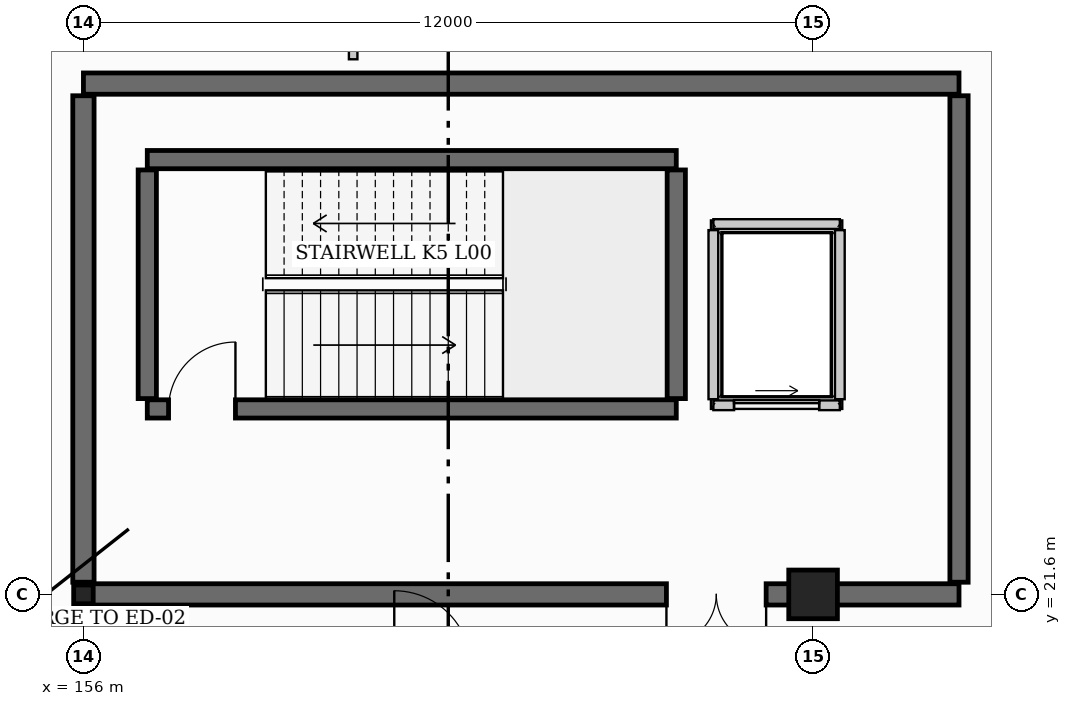
"""IFC4 building model, lengths in metres.
Left out: names, types, materials, properties, quantities, classifications, styles, units other than length and angle.
Written with IfcOpenShell. Run it as: python <this file> out.ifc"""

import sys

from ifc_helpers import new_model, si_unit, direction, frame, frame_2d, origin, origin_2d, place, context, subcontext, project, spatial, rectangle, i_section, extrude, element, fill, save


model = new_model("IFC4")
c1 = context("Model", 3, precision=1e-05, world=origin(), true_north=direction((0.0, 1.0)))
c2 = subcontext(c1, "Body", "Model", "MODEL_VIEW")
j1 = project(units=[si_unit("LENGTHUNIT", "METRE"), si_unit("PLANEANGLEUNIT", "RADIAN")], contexts=[c1])
p1 = place(None, origin())
s1 = spatial("IfcSite", under=j1, at=p1, CompositionType="ELEMENT")
p2 = place(p1, origin())
s2 = spatial("IfcBuilding", under=s1, at=p2, CompositionType="ELEMENT")
p3 = place(p2, origin())
s3 = spatial("IfcBuildingStorey", under=s2, at=p3, CompositionType="ELEMENT", Elevation=0.0)
p4 = place(p3, frame((156.0, 21.6, 0.0), z_axis=(0.0, 0.0, 1.0), x_axis=(0.0, 1.0, 0.0)))
e1 = element("IfcColumn", 1, at=p4, inside=s3, PredefinedType="COLUMN", context=c2, shape_type="SweptSolid", body=[
    extrude(i_section(OverallWidth=0.309, OverallDepth=0.321, WebThickness=0.014, FlangeThickness=0.022, at=origin_2d()), origin(), (0.0, 0.0, 1.0), 4.8),
])
p5 = place(p3, frame((168.0, 21.6, 0.0), z_axis=(0.0, 0.0, 1.0), x_axis=(1.0, 0.0, 0.0)))
e2 = element("IfcColumn", 2, at=p5, inside=s3, PredefinedType="COLUMN", context=c2, shape_type="SweptSolid", body=[
    extrude(rectangle(XDim=0.8, YDim=0.8, at=origin_2d()), origin(), (0.0, 0.0, 1.0), 4.8),
])
p6 = place(p3, frame((156.0, 30.0, 0.0), z_axis=(0.0, 0.0, 1.0), x_axis=(1.0, 0.0, 0.0)))
e3 = element("IfcWall", 3, at=p6, inside=s3, PredefinedType="SHEAR", context=c2, shape_type="SweptSolid", body=[
    extrude(rectangle(XDim=14.4, YDim=0.35, at=frame_2d((7.2, 0.0))), origin(), (0.0, 0.0, 1.0), 4.8),
])
p7 = place(p3, frame((170.4, 21.6, 0.0), z_axis=(0.0, 0.0, 1.0), x_axis=(-1.0, 0.0, 0.0)))
e4 = element("IfcWall", 4, at=p7, inside=s3, PredefinedType="SHEAR", context=c2, shape_type="SweptSolid", body=[
    extrude(rectangle(XDim=14.4, YDim=0.35, at=frame_2d((7.2, 0.0))), origin(), (0.0, 0.0, 1.0), 4.8),
])
p8 = place(p7, frame((3.172, 0.0, 0.0)))
e5 = element("IfcOpeningElement", 5, at=p8, cuts=e4, PredefinedType="OPENING", context=c2, shape_type="SweptSolid", body=[
    extrude(rectangle(XDim=1.64, YDim=2.2, at=frame_2d((0.82, 1.1))), frame((0.0, 0.185, 0.0), z_axis=(0.0, -1.0, 0.0), x_axis=(1.0, 0.0, 0.0)), (0.0, 0.0, 1.0), 0.37),
])
p9 = place(p3, frame((156.0, 21.8, 0.0), z_axis=(0.0, 0.0, 1.0), x_axis=(0.0, 1.0, 0.0)))
e6 = element("IfcWall", 6, at=p9, inside=s3, PredefinedType="SHEAR", context=c2, shape_type="SweptSolid", body=[
    extrude(rectangle(XDim=8.0, YDim=0.35, at=frame_2d((4.0, 0.0))), origin(), (0.0, 0.0, 1.0), 4.8),
])
p10 = place(p3, frame((170.4, 29.8, 0.0), z_axis=(0.0, 0.0, 1.0), x_axis=(0.0, -1.0, 0.0)))
e7 = element("IfcWall", 7, at=p10, inside=s3, PredefinedType="SHEAR", context=c2, shape_type="SweptSolid", body=[
    extrude(rectangle(XDim=8.0, YDim=0.3, at=frame_2d((4.0, 0.0))), origin(), (0.0, 0.0, 1.0), 4.8),
])
p11 = place(p3, frame((157.05, 24.65, 0.0), z_axis=(0.0, 0.0, 1.0), x_axis=(1.0, 0.0, 0.0)))
e8 = element("IfcWall", 8, at=p11, inside=s3, PredefinedType="SHEAR", context=c2, shape_type="SweptSolid", body=[
    extrude(rectangle(XDim=8.7, YDim=0.3, at=frame_2d((4.35, 0.0))), origin(), (0.0, 0.0, 1.0), 4.8),
])
p12 = place(p11, frame((0.35, 0.0, 0.0)))
e9 = element("IfcOpeningElement", 9, at=p12, cuts=e8, PredefinedType="OPENING", context=c2, shape_type="SweptSolid", body=[
    extrude(rectangle(XDim=1.1, YDim=2.15, at=frame_2d((0.55, 1.075))), frame((0.0, 0.16, 0.0), z_axis=(0.0, -1.0, 0.0), x_axis=(1.0, 0.0, 0.0)), (0.0, 0.0, 1.0), 0.32),
])
p13 = place(p3, frame((165.75, 28.75, 0.0), z_axis=(0.0, 0.0, 1.0), x_axis=(-1.0, 0.0, 0.0)))
e10 = element("IfcWall", 10, at=p13, inside=s3, PredefinedType="SHEAR", context=c2, shape_type="SweptSolid", body=[
    extrude(rectangle(XDim=8.7, YDim=0.3, at=frame_2d((4.35, 0.0))), origin(), (0.0, 0.0, 1.0), 4.8),
])
for number, where, z_axis, x_axis in (
    (11, (157.05, 24.82, 0.0), (0.0, 0.0, 1.0), (0.0, 1.0, 0.0)),
    (12, (165.75, 24.82, 0.0), (0.0, 0.0, 1.0), (0.0, 1.0, 0.0)),
):
    element("IfcWall", number, at=place(p3, frame(where, z_axis=z_axis, x_axis=x_axis)), inside=s3, PredefinedType="SHEAR", context=c2, shape_type="SweptSolid", body=[
        extrude(rectangle(XDim=3.76, YDim=0.3, at=frame_2d((1.88, 0.0))), origin(), (0.0, 0.0, 1.0), 4.8),
    ])
p14 = place(p3, frame((166.36, 24.71, 0.0), z_axis=(0.0, 0.0, 1.0), x_axis=(1.0, 0.0, 0.0)))
e13 = element("IfcWall", 13, at=p14, inside=s3, PredefinedType="PARTITIONING", context=c2, shape_type="SweptSolid", body=[
    extrude(rectangle(XDim=2.08, YDim=0.16, at=frame_2d((1.04, 0.0))), origin(), (0.0, 0.0, 1.0), 4.445),
])
p15 = place(p14, frame((0.34, 0.0, 0.0)))
e14 = element("IfcOpeningElement", 14, at=p15, cuts=e13, PredefinedType="OPENING", context=c2, shape_type="SweptSolid", body=[
    extrude(rectangle(XDim=1.4, YDim=2.2, at=frame_2d((0.7, 1.1))), frame((0.0, 0.09, 0.0), z_axis=(0.0, -1.0, 0.0), x_axis=(1.0, 0.0, 0.0)), (0.0, 0.0, 1.0), 0.18),
])
p16 = place(p3, frame((168.44, 27.69, 0.0), z_axis=(0.0, 0.0, 1.0), x_axis=(-1.0, 0.0, 0.0)))
e15 = element("IfcWall", 15, at=p16, inside=s3, PredefinedType="PARTITIONING", context=c2, shape_type="SweptSolid", body=[
    extrude(rectangle(XDim=2.08, YDim=0.16, at=frame_2d((1.04, 0.0))), origin(), (0.0, 0.0, 1.0), 4.445),
])
for number, where, z_axis, x_axis in (
    (16, (166.36, 27.59, 0.0), (0.0, 0.0, 1.0), (0.0, -1.0, 0.0)),
    (17, (168.44, 24.81, 0.0), (0.0, 0.0, 1.0), (0.0, 1.0, 0.0)),
):
    element("IfcWall", number, at=place(p3, frame(where, z_axis=z_axis, x_axis=x_axis)), inside=s3, PredefinedType="PARTITIONING", context=c2, shape_type="SweptSolid", body=[
        extrude(rectangle(XDim=2.78, YDim=0.16, at=frame_2d((1.39, 0.0))), origin(), (0.0, 0.0, 1.0), 4.445),
    ])
p17 = place(p3, frame((160.436, 30.4, 0.0), z_axis=(0.0, 0.0, 1.0), x_axis=(0.0, 1.0, 0.0)))
e18 = element("IfcWall", 18, at=p17, inside=s3, PredefinedType="PARTITIONING", context=c2, shape_type="SweptSolid", body=[
    extrude(rectangle(XDim=14.9, YDim=0.14, at=frame_2d((7.45, 0.0))), origin(), (0.0, 0.0, 1.0), 3.818),
])
p18 = place(p15, origin())
e19 = element("IfcDoor", 19, at=p18, inside=s3, OperationType="SLIDING_TO_LEFT", PredefinedType="DOOR", context=c2, shape_type="SweptSolid", body=[
    extrude(rectangle(XDim=1.4, YDim=2.2, at=frame_2d((0.7, 1.1))), frame((0.0, 0.025, 0.0), z_axis=(0.0, -1.0, 0.0), x_axis=(1.0, 0.0, 0.0)), (0.0, 0.0, 1.0), 0.05),
])
fill(e14, e19)
p19 = place(p12, origin())
e20 = element("IfcDoor", 20, at=p19, inside=s3, OperationType="SINGLE_SWING_RIGHT", PredefinedType="DOOR", context=c2, shape_type="SweptSolid", body=[
    extrude(rectangle(XDim=1.1, YDim=2.15, at=frame_2d((0.55, 1.075))), frame((0.0, 0.025, 0.0), z_axis=(0.0, -1.0, 0.0), x_axis=(1.0, 0.0, 0.0)), (0.0, 0.0, 1.0), 0.05),
])
fill(e9, e20)
p20 = place(p8, origin())
e21 = element("IfcDoor", 21, at=p20, inside=s3, OperationType="DOUBLE_DOOR_SINGLE_SWING", PredefinedType="DOOR", context=c2, shape_type="SweptSolid", body=[
    extrude(rectangle(XDim=1.64, YDim=2.2, at=frame_2d((0.82, 1.1))), frame((0.0, 0.025, 0.0), z_axis=(0.0, -1.0, 0.0), x_axis=(1.0, 0.0, 0.0)), (0.0, 0.0, 1.0), 0.05),
])
fill(e5, e21)
save(model, sys.argv[1])
